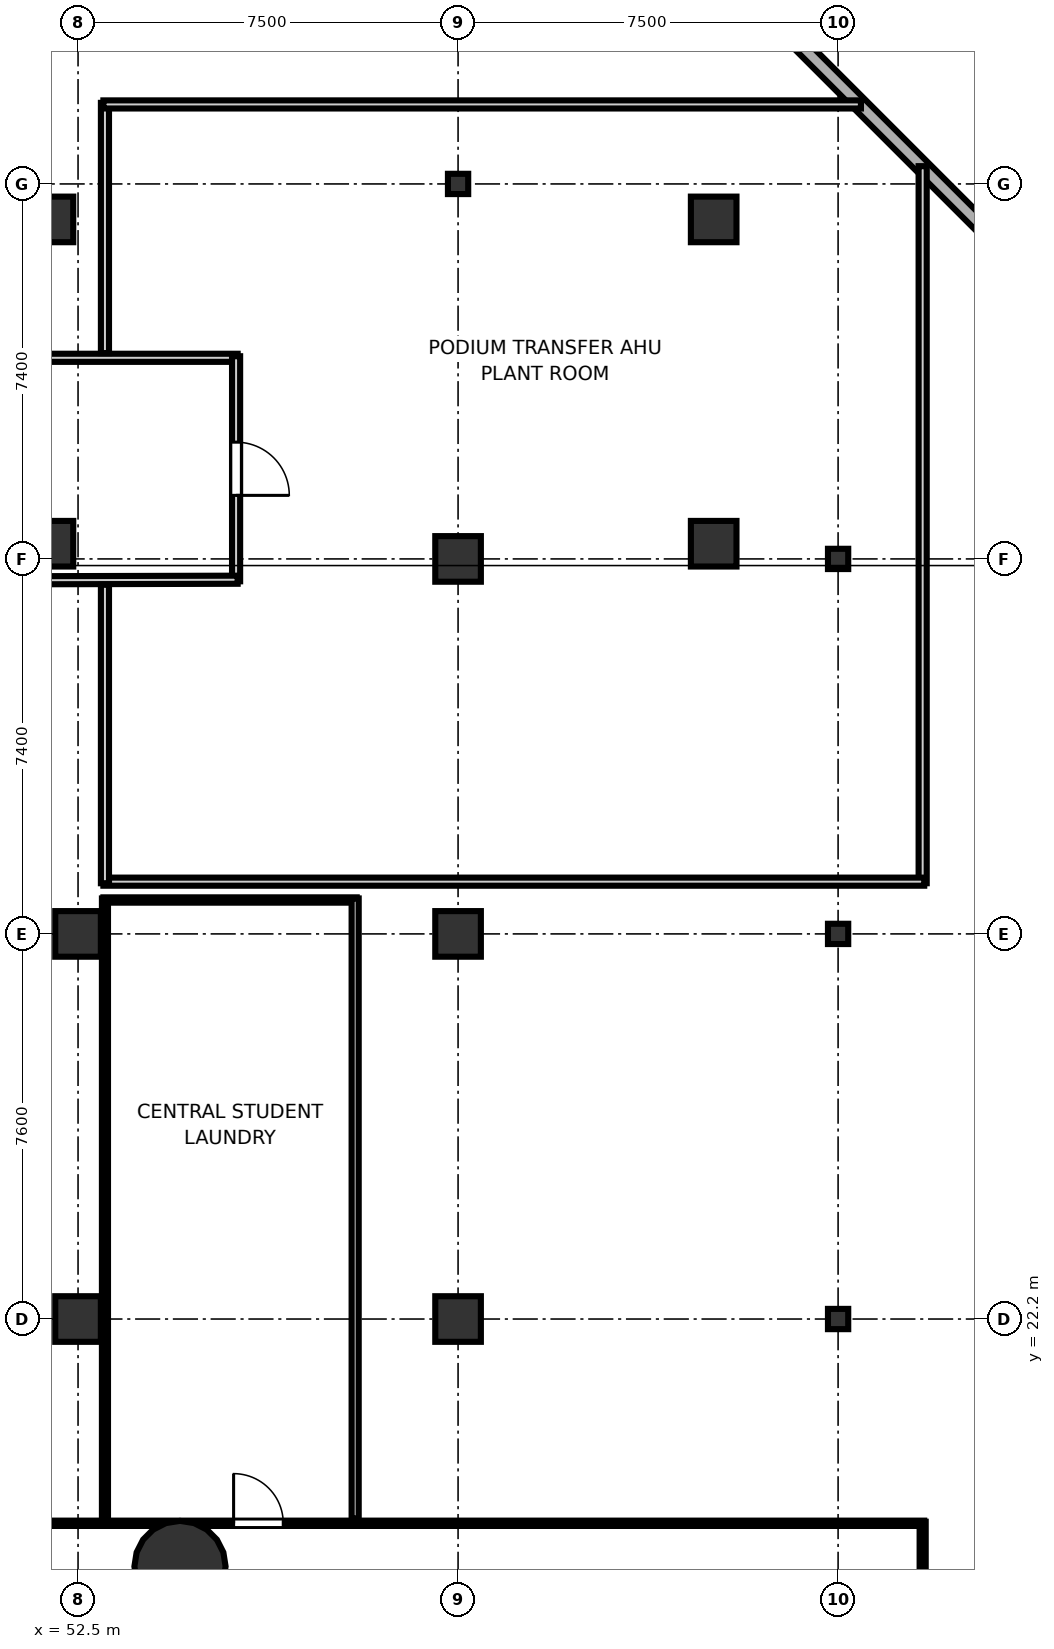
"""IFC4 building model, lengths in metres.
Left out: names, types, materials, properties, quantities, classifications, styles, units other than length and angle.
Written with IfcOpenShell. Run it as: python <this file> out.ifc"""

import sys

from ifc_helpers import new_model, si_unit, direction, frame, frame_2d, origin, origin_2d, place, context, subcontext, project, spatial, rectangle, hollow_circle, i_section, extrude, element, fill, save


model = new_model("IFC4")
c1 = context("Model", 3, precision=1e-05, world=origin(), true_north=direction((0.0, 1.0)))
c2 = subcontext(c1, "Body", "Model", "MODEL_VIEW")
j1 = project(units=[si_unit("LENGTHUNIT", "METRE"), si_unit("PLANEANGLEUNIT", "RADIAN")], contexts=[c1])
p1 = place(None, origin())
s1 = spatial("IfcSite", under=j1, at=p1, CompositionType="ELEMENT")
p2 = place(p1, origin())
s2 = spatial("IfcBuilding", under=s1, at=p2, CompositionType="ELEMENT")
p3 = place(p2, frame((0.0, 0.0, 20.6)))
s3 = spatial("IfcBuildingStorey", under=s2, at=p3, CompositionType="ELEMENT", Elevation=20.6)
p4 = place(p3, frame((54.512, 17.317, 0.0), z_axis=(0.0, 0.0, 1.0), x_axis=(1.0, 0.0, 0.0)))
e1 = element("IfcColumn", 1, at=p4, inside=s3, PredefinedType="COLUMN", context=c2, shape_type="SweptSolid", body=[
    extrude(hollow_circle(Radius=0.9, WallThickness=0.045, at=origin_2d()), origin(), (0.0, 0.0, 1.0), 5.1),
])
for number, where, z_axis, x_axis in (
    (2, (51.955, 43.9, 0.0), (0.0, 0.0, 1.0), (1.0, 0.0, 0.0)),
    (3, (51.955, 37.5, 0.0), (0.0, 0.0, 1.0), (1.0, 0.0, 0.0)),
    (4, (65.045, 43.9, 0.0), (0.0, 0.0, 1.0), (1.0, 0.0, 0.0)),
    (5, (65.045, 37.5, 0.0), (0.0, 0.0, 1.0), (1.0, 0.0, 0.0)),
    (6, (52.5, 22.2, 0.0), (0.0, 0.0, 1.0), (1.0, 0.0, 0.0)),
    (7, (52.5, 29.8, 0.0), (0.0, 0.0, 1.0), (1.0, 0.0, 0.0)),
    (8, (60.0, 22.2, 0.0), (0.0, 0.0, 1.0), (1.0, 0.0, 0.0)),
    (9, (60.0, 29.8, 0.0), (0.0, 0.0, 1.0), (1.0, 0.0, 0.0)),
    (10, (60.0, 37.2, 0.0), (0.0, 0.0, 1.0), (1.0, 0.0, 0.0)),
):
    element("IfcColumn", number, at=place(p3, frame(where, z_axis=z_axis, x_axis=x_axis)), inside=s3, PredefinedType="COLUMN", context=c2, shape_type="SweptSolid", body=[
        extrude(rectangle(XDim=0.9, YDim=0.9, at=origin_2d()), origin(), (0.0, 0.0, 1.0), 5.1),
    ])
for number, where, z_axis, x_axis in (
    (11, (60.0, 44.6, 0.0), (0.0, 0.0, 1.0), (1.0, 0.0, 0.0)),
    (12, (67.5, 22.2, 0.0), (0.0, 0.0, 1.0), (1.0, 0.0, 0.0)),
    (13, (67.5, 29.8, 0.0), (0.0, 0.0, 1.0), (1.0, 0.0, 0.0)),
    (14, (67.5, 37.2, 0.0), (0.0, 0.0, 1.0), (1.0, 0.0, 0.0)),
):
    element("IfcColumn", number, at=place(p3, frame(where, z_axis=z_axis, x_axis=x_axis)), inside=s3, PredefinedType="COLUMN", context=c2, shape_type="SweptSolid", body=[
        extrude(i_section(OverallWidth=0.4, OverallDepth=0.4, WebThickness=0.013, FlangeThickness=0.021, at=origin_2d()), origin(), (0.0, 0.0, 1.0), 5.1),
    ])
p5 = place(p3, frame((70.8, 43.3, 0.0), z_axis=(0.0, 0.0, 1.0), x_axis=(-0.707106781187, 0.707106781187, 0.0)))
e15 = element("IfcWall", 15, at=p5, inside=s3, PredefinedType="SOLIDWALL", context=c2, shape_type="SweptSolid", body=[
    extrude(rectangle(XDim=5.94, YDim=0.28, at=frame_2d((2.97, 0.0))), origin(), (0.0, 0.0, 1.0), 4.88),
])
p6 = place(p3, frame((46.5, 41.169, 0.0), z_axis=(0.0, 0.0, 1.0), x_axis=(1.0, 0.0, 0.0)))
e16 = element("IfcWall", 16, at=p6, inside=s3, PredefinedType="PARTITIONING", context=c2, shape_type="SweptSolid", body=[
    extrude(rectangle(XDim=9.15, YDim=0.16, at=frame_2d((4.575, 0.0))), origin(), (0.0, 0.0, 1.0), 3.4),
])
p7 = place(p3, frame((55.619, 41.2, 0.0), z_axis=(0.0, 0.0, 1.0), x_axis=(0.0, -1.0, 0.0)))
e17 = element("IfcWall", 17, at=p7, inside=s3, PredefinedType="PARTITIONING", context=c2, shape_type="SweptSolid", body=[
    extrude(rectangle(XDim=4.442, YDim=0.16, at=frame_2d((2.221, 0.0))), origin(), (0.0, 0.0, 1.0), 3.4),
])
p8 = place(p7, frame((1.696, 0.0, 0.0)))
e18 = element("IfcOpeningElement", 18, at=p8, cuts=e17, PredefinedType="OPENING", context=c2, shape_type="SweptSolid", body=[
    extrude(rectangle(XDim=1.05, YDim=2.15, at=frame_2d((0.525, 1.075))), frame((0.0, 0.09, 0.0), z_axis=(0.0, -1.0, 0.0), x_axis=(1.0, 0.0, 0.0)), (0.0, 0.0, 1.0), 0.18),
])
p9 = place(p3, frame((55.65, 36.789, 0.0), z_axis=(0.0, 0.0, 1.0), x_axis=(-0.999996901459, -0.002489391821, 0.0)))
e19 = element("IfcWall", 19, at=p9, inside=s3, PredefinedType="PARTITIONING", context=c2, shape_type="SweptSolid", body=[
    extrude(rectangle(XDim=8.925, YDim=0.16, at=frame_2d((4.462, 0.0))), origin(), (0.0, 0.0, 1.0), 3.4),
])
p10 = place(p3, frame((69.169, 18.2, 0.0), z_axis=(0.0, 0.0, 1.0), x_axis=(0.0, -1.0, 0.0)))
e20 = element("IfcWall", 20, at=p10, inside=s3, PredefinedType="PARTITIONING", context=c2, shape_type="SweptSolid", body=[
    extrude(rectangle(XDim=11.151, YDim=0.12, at=frame_2d((5.575, 0.0))), origin(), (0.0, 0.0, 1.0), 3.4),
])
p11 = place(p3, frame((42.3, 18.169, 0.0), z_axis=(0.0, 0.0, 1.0), x_axis=(1.0, 0.0, 0.0)))
e21 = element("IfcWall", 21, at=p11, inside=s3, PredefinedType="PARTITIONING", context=c2, shape_type="SweptSolid", body=[
    extrude(rectangle(XDim=26.9, YDim=0.105, at=frame_2d((13.45, 0.0))), origin(), (0.0, 0.0, 1.0), 3.378),
])
p12 = place(p11, frame((13.27, 0.0, 0.0)))
e22 = element("IfcOpeningElement", 22, at=p12, cuts=e21, PredefinedType="OPENING", context=c2, shape_type="SweptSolid", body=[
    extrude(rectangle(XDim=0.98, YDim=2.1, at=frame_2d((0.49, 1.05))), frame((0.0, 0.062, 0.0), z_axis=(0.0, -1.0, 0.0), x_axis=(1.0, 0.0, 0.0)), (0.0, 0.0, 1.0), 0.125),
])
p13 = place(p3, frame((53.031, 18.262, 0.0), z_axis=(0.0, 0.0, 1.0), x_axis=(0.0, 1.0, 0.0)))
e23 = element("IfcWall", 23, at=p13, inside=s3, PredefinedType="PARTITIONING", context=c2, shape_type="SweptSolid", body=[
    extrude(rectangle(XDim=12.238, YDim=0.12, at=frame_2d((6.119, 0.0))), origin(), (0.0, 0.0, 1.0), 3.378),
])
p14 = place(p3, frame((53.0, 30.469, 0.0), z_axis=(0.0, 0.0, 1.0), x_axis=(1.0, 0.0, 0.0)))
e24 = element("IfcWall", 24, at=p14, inside=s3, PredefinedType="PARTITIONING", context=c2, shape_type="SweptSolid", body=[
    extrude(rectangle(XDim=5.0, YDim=0.105, at=frame_2d((2.5, 0.0))), origin(), (0.0, 0.0, 1.0), 3.4),
])
p15 = place(p3, frame((57.969, 30.5, 0.0), z_axis=(0.0, 0.0, 1.0), x_axis=(0.0, -1.0, 0.0)))
e25 = element("IfcWall", 25, at=p15, inside=s3, PredefinedType="PARTITIONING", context=c2, shape_type="SweptSolid", body=[
    extrude(rectangle(XDim=12.238, YDim=0.14, at=frame_2d((6.119, 0.0))), origin(), (0.0, 0.0, 1.0), 3.4),
])
p16 = place(p3, frame((53.031, 41.262, 0.0), z_axis=(0.0, 0.0, 1.0), x_axis=(0.0, 1.0, 0.0)))
e26 = element("IfcWall", 26, at=p16, inside=s3, PredefinedType="PARTITIONING", context=c2, shape_type="SweptSolid", body=[
    extrude(rectangle(XDim=4.938, YDim=0.16, at=frame_2d((2.469, 0.0))), origin(), (0.0, 0.0, 1.0), 3.4),
])
p17 = place(p3, frame((53.0, 46.169, 0.0), z_axis=(0.0, 0.0, 1.0), x_axis=(1.0, 0.0, 0.0)))
e27 = element("IfcWall", 27, at=p17, inside=s3, PredefinedType="PARTITIONING", context=c2, shape_type="SweptSolid", body=[
    extrude(rectangle(XDim=14.951, YDim=0.16, at=frame_2d((7.476, 0.0))), origin(), (0.0, 0.0, 1.0), 3.4),
])
p18 = place(p3, frame((69.169, 44.951, 0.0), z_axis=(0.0, 0.0, 1.0), x_axis=(0.0, -1.0, 0.0)))
e28 = element("IfcWall", 28, at=p18, inside=s3, PredefinedType="PARTITIONING", context=c2, shape_type="SweptSolid", body=[
    extrude(rectangle(XDim=14.151, YDim=0.16, at=frame_2d((7.075, 0.0))), origin(), (0.0, 0.0, 1.0), 3.4),
])
p19 = place(p3, frame((69.2, 30.831, 0.0), z_axis=(0.0, 0.0, 1.0), x_axis=(-1.0, 0.0, 0.0)))
e29 = element("IfcWall", 29, at=p19, inside=s3, PredefinedType="PARTITIONING", context=c2, shape_type="SweptSolid", body=[
    extrude(rectangle(XDim=16.2, YDim=0.16, at=frame_2d((8.1, 0.0))), origin(), (0.0, 0.0, 1.0), 3.4),
])
p20 = place(p3, frame((53.031, 30.8, 0.0), z_axis=(0.0, 0.0, 1.0), x_axis=(0.0, 1.0, 0.0)))
e30 = element("IfcWall", 30, at=p20, inside=s3, PredefinedType="PARTITIONING", context=c2, shape_type="SweptSolid", body=[
    extrude(rectangle(XDim=5.89, YDim=0.16, at=frame_2d((2.945, 0.0))), origin(), (0.0, 0.0, 1.0), 3.4),
])
p21 = place(p8, origin())
e31 = element("IfcDoor", 31, at=p21, inside=s3, OperationType="SINGLE_SWING_RIGHT", PredefinedType="DOOR", context=c2, shape_type="SweptSolid", body=[
    extrude(rectangle(XDim=1.05, YDim=2.15, at=frame_2d((0.525, 1.075))), frame((0.0, 0.025, 0.0), z_axis=(0.0, -1.0, 0.0), x_axis=(1.0, 0.0, 0.0)), (0.0, 0.0, 1.0), 0.05),
])
fill(e18, e31)
p22 = place(p12, origin())
e32 = element("IfcDoor", 32, at=p22, inside=s3, OperationType="SINGLE_SWING_LEFT", PredefinedType="DOOR", context=c2, shape_type="SweptSolid", body=[
    extrude(rectangle(XDim=0.98, YDim=2.1, at=frame_2d((0.49, 1.05))), frame((0.0, 0.025, 0.0), z_axis=(0.0, -1.0, 0.0), x_axis=(1.0, 0.0, 0.0)), (0.0, 0.0, 1.0), 0.05),
])
fill(e22, e32)
save(model, sys.argv[1])
